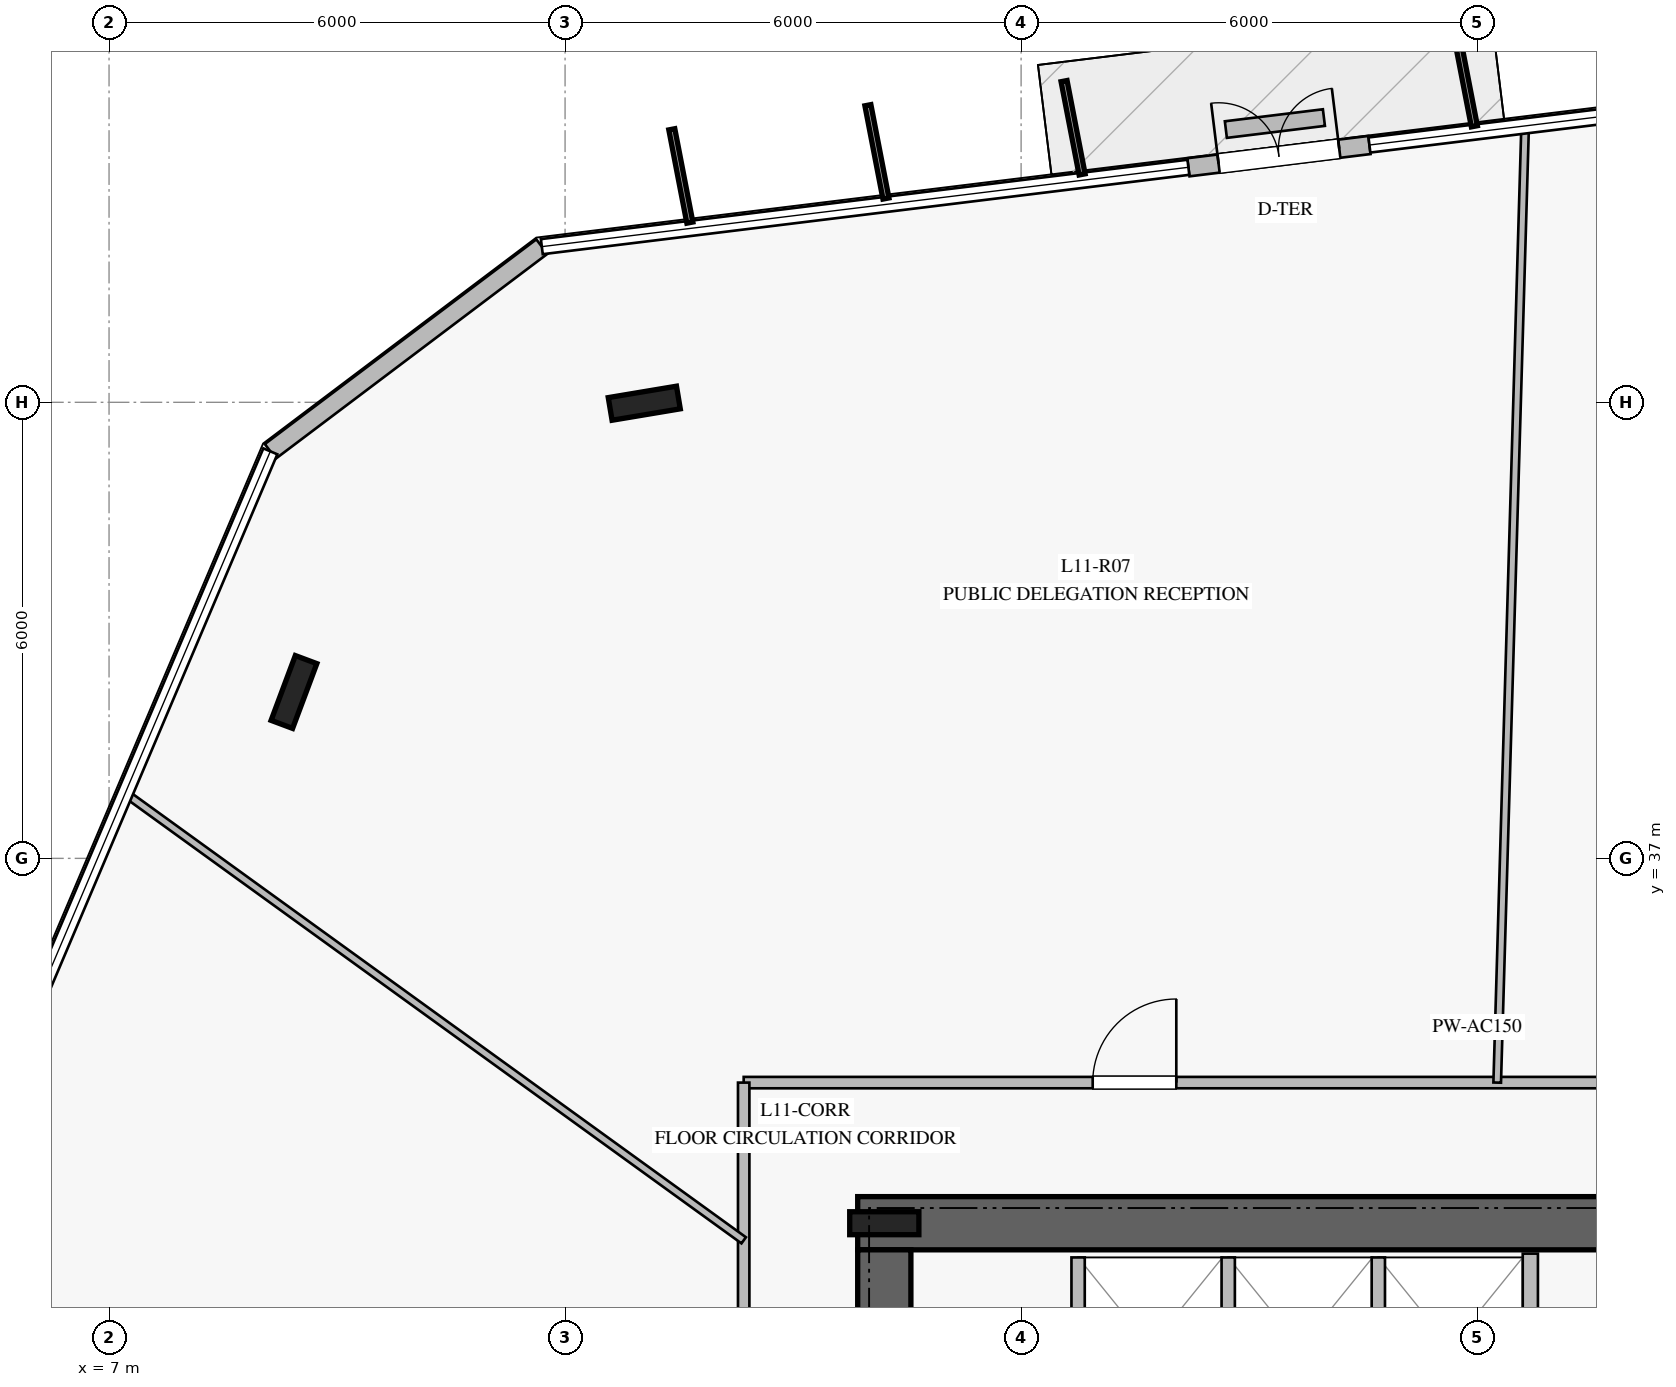
"""IFC4 building model, lengths in metres.
Left out: names, types, materials, properties, quantities, classifications, styles, units other than length and angle.
Written with IfcOpenShell. Run it as: python <this file> out.ifc"""

import sys

from ifc_helpers import new_model, si_unit, direction, frame, frame_2d, origin, origin_2d, place, context, subcontext, project, spatial, rectangle, i_section, extrude, element, fill, save


model = new_model("IFC4")
c1 = context("Model", 3, precision=1e-05, world=origin(), true_north=direction((0.0, 1.0)))
c2 = subcontext(c1, "Body", "Model", "MODEL_VIEW")
j1 = project(units=[si_unit("LENGTHUNIT", "METRE"), si_unit("PLANEANGLEUNIT", "RADIAN")], contexts=[c1])
p1 = place(None, origin())
s1 = spatial("IfcSite", under=j1, at=p1, CompositionType="ELEMENT")
p2 = place(p1, origin())
s2 = spatial("IfcBuilding", under=s1, at=p2, CompositionType="ELEMENT")
p3 = place(p2, frame((0.0, 0.0, 48.0)))
s3 = spatial("IfcBuildingStorey", under=s2, at=p3, CompositionType="ELEMENT", Elevation=48.0)
p4 = place(p3, frame((33.15, 32.2, 0.0), z_axis=(0.0, 0.0, 1.0), x_axis=(-1.0, 0.0, 0.0)))
e1 = element("IfcWall", 1, at=p4, inside=s3, PredefinedType="SHEAR", context=c2, shape_type="SweptSolid", body=[
    extrude(rectangle(XDim=16.3, YDim=0.7, at=frame_2d((8.15, 0.0))), origin(), (0.0, 0.0, 1.0), 3.76),
])
p5 = place(p4, frame((5.1, 0.0, 0.0)))
e2 = element("IfcOpeningElement", 2, at=p5, cuts=e1, PredefinedType="OPENING", context=c2, shape_type="SweptSolid", body=[
    extrude(rectangle(XDim=1.2, YDim=2.25, at=frame_2d((0.6, 1.125))), frame((0.0, 0.36, 0.0), z_axis=(0.0, -1.0, 0.0), x_axis=(1.0, 0.0, 0.0)), (0.0, 0.0, 1.0), 0.72),
])
p6 = place(p3, frame((17.2, 31.85, 0.0), z_axis=(0.0, 0.0, 1.0), x_axis=(0.0, -1.0, 0.0)))
e3 = element("IfcWall", 3, at=p6, inside=s3, PredefinedType="SHEAR", context=c2, shape_type="SweptSolid", body=[
    extrude(rectangle(XDim=13.7, YDim=0.7, at=frame_2d((6.85, 0.0))), origin(), (0.0, 0.0, 1.0), 3.76),
])
p7 = place(p6, frame((2.0, 0.0, 0.0)))
e4 = element("IfcOpeningElement", 4, at=p7, cuts=e3, PredefinedType="OPENING", context=c2, shape_type="SweptSolid", body=[
    extrude(rectangle(XDim=1.5, YDim=2.2, at=frame_2d((0.75, 1.1))), frame((0.0, 0.36, 0.0), z_axis=(0.0, -1.0, 0.0), x_axis=(1.0, 0.0, 0.0)), (0.0, 0.0, 1.0), 0.72),
])
for number, where, z_axis, x_axis in (
    (5, (17.2, 32.2, 0.0), (0.0, 0.0, 1.0), (1.0, 0.0, 0.0)),
    (6, (14.042, 42.988, 0.0), (0.0, 0.0, 1.0), (0.986, 0.165, 0.0)),
    (7, (9.433, 39.189, 0.0), (0.0, 0.0, 1.0), (0.35, 0.937, 0.0)),
):
    element("IfcColumn", number, at=place(p3, frame(where, z_axis=z_axis, x_axis=x_axis)), inside=s3, PredefinedType="COLUMN", context=c2, shape_type="SweptSolid", body=[
        extrude(i_section(OverallWidth=0.302, OverallDepth=0.91, WebThickness=0.021, FlangeThickness=0.04, at=origin_2d()), origin(), (0.0, 0.0, 1.0), 4.0),
    ])
p8 = place(p3, frame((23.583, 46.385, 0.0), z_axis=(0.0, 0.0, 1.0), x_axis=(-0.992521632568, -0.122068869435, 0.0)))
e8 = element("IfcWall", 8, at=p8, inside=s3, PredefinedType="STANDARD", context=c2, shape_type="SweptSolid", body=[
    extrude(rectangle(XDim=2.4, YDim=0.24, at=frame_2d((1.2, 0.0))), origin(), (0.0, 0.0, 1.0), 3.76),
])
p9 = place(p8, frame((0.4, 0.0, 0.0)))
e9 = element("IfcOpeningElement", 9, at=p9, cuts=e8, PredefinedType="OPENING", context=c2, shape_type="SweptSolid", body=[
    extrude(rectangle(XDim=1.6, YDim=2.25, at=frame_2d((0.8, 1.125))), frame((0.0, 0.13, 0.0), z_axis=(0.0, -1.0, 0.0), x_axis=(1.0, 0.0, 0.0)), (0.0, 0.0, 1.0), 0.26),
])
p10 = place(p3, frame((12.694, 45.048, 0.0), z_axis=(0.0, 0.0, 1.0), x_axis=(-0.798484642233, -0.602015179309, 0.0)))
e10 = element("IfcWall", 10, at=p10, inside=s3, PredefinedType="STANDARD", context=c2, shape_type="SweptSolid", body=[
    extrude(rectangle(XDim=4.473, YDim=0.24, at=frame_2d((2.237, 0.0))), origin(), (0.0, 0.0, 1.0), 3.76),
])
p11 = place(p3, frame((22.984, 46.746, 0.0), z_axis=(0.0, 0.0, 1.0), x_axis=(-0.99256138924, -0.121745178919, 0.0)))
e11 = element("IfcWall", 11, at=p11, inside=s3, PredefinedType="USERDEFINED", context=c2, shape_type="SweptSolid", body=[
    extrude(rectangle(XDim=1.3, YDim=0.22, at=frame_2d((0.65, 0.0))), origin(), (0.0, 0.0, 1.0), 0.4),
])
p12 = place(p3, frame((25.7, 26.65, 0.0), z_axis=(0.0, 0.0, 1.0), x_axis=(0.0, 1.0, 0.0)))
e12 = element("IfcWall", 12, at=p12, inside=s3, PredefinedType="PARTITIONING", context=c2, shape_type="SweptSolid", body=[
    extrude(rectangle(XDim=5.15, YDim=0.2, at=frame_2d((2.575, 0.0))), origin(), (0.0, 0.0, 1.0), 3.76),
])
for number, where, z_axis, x_axis in (
    (13, (19.75, 29.4, 0.0), (0.0, 0.0, 1.0), (0.0, 1.0, 0.0)),
    (14, (21.725, 29.4, 0.0), (0.0, 0.0, 1.0), (0.0, 1.0, 0.0)),
    (15, (23.7, 29.4, 0.0), (0.0, 0.0, 1.0), (0.0, 1.0, 0.0)),
):
    element("IfcWall", number, at=place(p3, frame(where, z_axis=z_axis, x_axis=x_axis)), inside=s3, PredefinedType="PARTITIONING", context=c2, shape_type="SweptSolid", body=[
        extrude(rectangle(XDim=2.35, YDim=0.175, at=frame_2d((1.175, 0.0))), origin(), (0.0, 0.0, 1.0), 3.76),
    ])
p13 = place(p3, frame((15.35, 34.05, 0.0), z_axis=(0.0, 0.0, 1.0), x_axis=(1.0, 0.0, 0.0)))
e16 = element("IfcWall", 16, at=p13, inside=s3, PredefinedType="PARTITIONING", context=c2, shape_type="SweptSolid", body=[
    extrude(rectangle(XDim=19.3, YDim=0.15, at=frame_2d((9.65, 0.0))), origin(), (0.0, 0.0, 1.0), 3.21),
])
p14 = place(p13, frame((13.789, 0.0, 0.0)))
e17 = element("IfcOpeningElement", 17, at=p14, cuts=e16, PredefinedType="OPENING", context=c2, shape_type="SweptSolid", body=[
    extrude(rectangle(XDim=1.1, YDim=2.2, at=frame_2d((0.55, 1.1))), frame((0.0, 0.085, 0.0), z_axis=(0.0, -1.0, 0.0), x_axis=(1.0, 0.0, 0.0)), (0.0, 0.0, 1.0), 0.17),
])
p15 = place(p13, frame((4.592, 0.0, 0.0)))
e18 = element("IfcOpeningElement", 18, at=p15, cuts=e16, PredefinedType="OPENING", context=c2, shape_type="SweptSolid", body=[
    extrude(rectangle(XDim=1.1, YDim=2.2, at=frame_2d((0.55, 1.1))), frame((0.0, 0.085, 0.0), z_axis=(0.0, -1.0, 0.0), x_axis=(1.0, 0.0, 0.0)), (0.0, 0.0, 1.0), 0.17),
])
p16 = place(p3, frame((15.35, 15.95, 0.0), z_axis=(0.0, 0.0, 1.0), x_axis=(0.0, 1.0, 0.0)))
e19 = element("IfcWall", 19, at=p16, inside=s3, PredefinedType="PARTITIONING", context=c2, shape_type="SweptSolid", body=[
    extrude(rectangle(XDim=18.1, YDim=0.15, at=frame_2d((9.05, 0.0))), origin(), (0.0, 0.0, 1.0), 3.21),
])
p17 = place(p16, frame((9.84, 0.0, 0.0)))
e20 = element("IfcOpeningElement", 20, at=p17, cuts=e19, PredefinedType="OPENING", context=c2, shape_type="SweptSolid", body=[
    extrude(rectangle(XDim=1.1, YDim=2.2, at=frame_2d((0.55, 1.1))), frame((0.0, 0.085, 0.0), z_axis=(0.0, -1.0, 0.0), x_axis=(1.0, 0.0, 0.0)), (0.0, 0.0, 1.0), 0.17),
])
p18 = place(p3, frame((25.264, 34.05, 0.0), z_axis=(0.0, 0.0, 1.0), x_axis=(0.029203902764, 0.99957347507, 0.0)))
e21 = element("IfcWall", 21, at=p18, inside=s3, PredefinedType="MOVABLE", context=c2, shape_type="SweptSolid", body=[
    extrude(rectangle(XDim=12.573, YDim=0.1, at=frame_2d((6.287, 0.0))), origin(), (0.0, 0.0, 1.0), 3.05),
])
p19 = place(p3, frame((15.35, 31.975, 0.0), z_axis=(0.0, 0.0, 1.0), x_axis=(-0.810433800227, 0.585830227497, 0.0)))
e22 = element("IfcWall", 22, at=p19, inside=s3, PredefinedType="MOVABLE", context=c2, shape_type="SweptSolid", body=[
    extrude(rectangle(XDim=10.023, YDim=0.1, at=frame_2d((5.012, 0.0))), origin(), (0.0, 0.0, 1.0), 3.06),
])
p20 = place(p9, frame((1.6, 0.0, 0.0), z_axis=(0.0, 0.0, 1.0), x_axis=(-1.0, 0.0, 0.0)))
e23 = element("IfcDoor", 23, at=p20, inside=s3, OperationType="DOUBLE_DOOR_SINGLE_SWING", PredefinedType="DOOR", context=c2, shape_type="SweptSolid", body=[
    extrude(rectangle(XDim=1.6, YDim=2.25, at=frame_2d((0.8, 1.125))), frame((0.0, 0.025, 0.0), z_axis=(0.0, -1.0, 0.0), x_axis=(1.0, 0.0, 0.0)), (0.0, 0.0, 1.0), 0.05),
])
fill(e9, e23)
p21 = place(p15, origin())
e24 = element("IfcDoor", 24, at=p21, inside=s3, OperationType="SINGLE_SWING_RIGHT", PredefinedType="DOOR", context=c2, shape_type="SweptSolid", body=[
    extrude(rectangle(XDim=1.1, YDim=2.2, at=frame_2d((0.55, 1.1))), frame((0.0, 0.025, 0.0), z_axis=(0.0, -1.0, 0.0), x_axis=(1.0, 0.0, 0.0)), (0.0, 0.0, 1.0), 0.05),
])
fill(e18, e24)
save(model, sys.argv[1])
